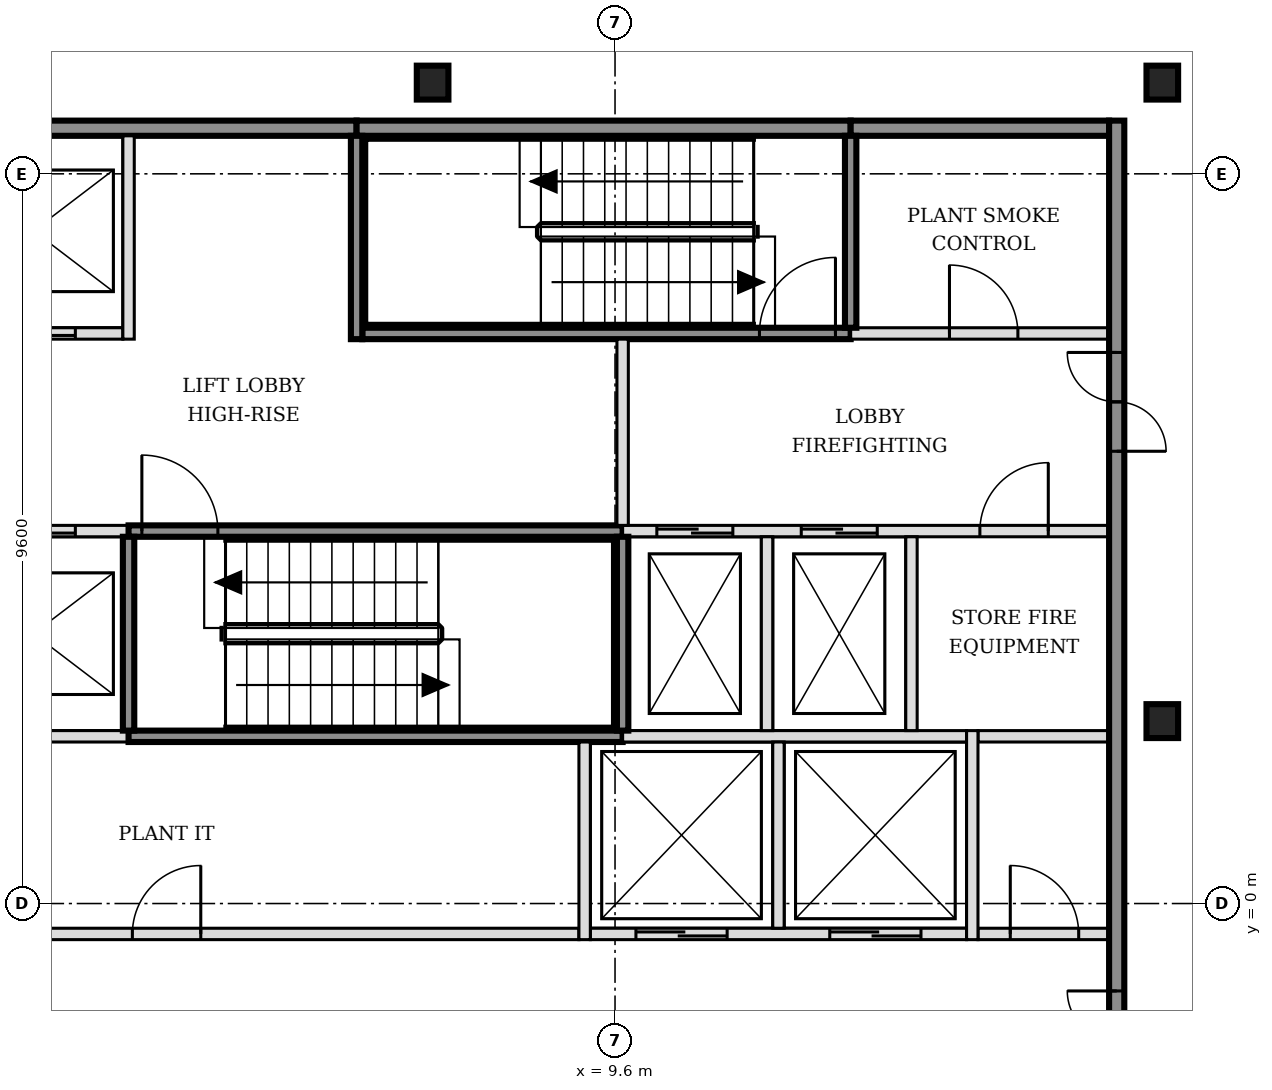
"""IFC4 building model, lengths in metres.
Left out: names, types, materials, properties, quantities, classifications, styles, units other than length and angle.
Written with IfcOpenShell. Run it as: python <this file> out.ifc"""

import sys

from ifc_helpers import new_model, si_unit, direction, frame, frame_2d, origin, origin_2d, place, context, subcontext, project, spatial, rectangle, i_section, extrude, element, fill, save


model = new_model("IFC4")
c1 = context("Model", 3, precision=1e-05, world=origin(), true_north=direction((0.0, 1.0)))
c2 = subcontext(c1, "Body", "Model", "MODEL_VIEW")
j1 = project(units=[si_unit("LENGTHUNIT", "METRE"), si_unit("PLANEANGLEUNIT", "RADIAN")], contexts=[c1])
p1 = place(None, origin())
s1 = spatial("IfcSite", under=j1, at=p1, CompositionType="ELEMENT")
p2 = place(p1, origin())
s2 = spatial("IfcBuilding", under=s1, at=p2, CompositionType="ELEMENT")
p3 = place(p2, frame((0.0, 0.0, 157.8)))
s3 = spatial("IfcBuildingStorey", under=s2, at=p3, CompositionType="ELEMENT", Elevation=157.8)
for number, where, z_axis, x_axis in (
    (1, (16.8, 2.4, -0.15), (0.0, 0.0, 1.0), (1.0, 0.0, 0.0)),
    (2, (7.2, 10.8, -0.15), (0.0, 0.0, 1.0), (1.0, 0.0, 0.0)),
    (3, (16.8, 10.8, -0.15), (0.0, 0.0, 1.0), (1.0, 0.0, 0.0)),
):
    element("IfcColumn", number, at=place(p3, frame(where, z_axis=z_axis, x_axis=x_axis)), inside=s3, PredefinedType="COLUMN", context=c2, shape_type="SweptSolid", body=[
        extrude(i_section(OverallWidth=0.416, OverallDepth=0.446, WebThickness=0.039, FlangeThickness=0.063, FilletRadius=0.015, at=origin_2d()), origin(), (0.0, 0.0, 1.0), 3.6),
    ])
p4 = place(p3, frame((-1.7, -0.4, 0.0), z_axis=(0.0, 0.0, 1.0), x_axis=(1.0, 0.0, 0.0)))
e4 = element("IfcWall", 4, at=p4, inside=s3, PredefinedType="PARTITIONING", context=c2, shape_type="SweptSolid", body=[
    extrude(rectangle(XDim=10.825, YDim=0.15, at=frame_2d((5.413, 0.0))), origin(), (0.0, 0.0, 1.0), 3.45),
])
p5 = place(p4, frame((4.95, 0.0, 0.0)))
e5 = element("IfcOpeningElement", 5, at=p5, cuts=e4, PredefinedType="OPENING", context=c2, shape_type="SweptSolid", body=[
    extrude(rectangle(XDim=0.9, YDim=2.1, at=frame_2d((0.45, 1.05))), frame((0.0, 0.085, 0.0), z_axis=(0.0, -1.0, 0.0), x_axis=(1.0, 0.0, 0.0)), (0.0, 0.0, 1.0), 0.17),
])
p6 = place(p3, frame((9.275, -0.4, 0.0), z_axis=(0.0, 0.0, 1.0), x_axis=(1.0, 0.0, 0.0)))
e6 = element("IfcWall", 6, at=p6, inside=s3, PredefinedType="SOLIDWALL", context=c2, shape_type="SweptSolid", body=[
    extrude(rectangle(XDim=4.95, YDim=0.15, at=frame_2d((2.475, 0.0))), origin(), (0.0, 0.0, 1.0), 3.45),
])
p7 = place(p6, frame((0.6, 0.0, 0.0)))
e7 = element("IfcOpeningElement", 7, at=p7, cuts=e6, PredefinedType="OPENING", context=c2, shape_type="SweptSolid", body=[
    extrude(rectangle(XDim=1.2, YDim=2.1, at=frame_2d((0.6, 1.05))), frame((0.0, 0.085, 0.0), z_axis=(0.0, -1.0, 0.0), x_axis=(1.0, 0.0, 0.0)), (0.0, 0.0, 1.0), 0.17),
])
p8 = place(p6, frame((3.15, 0.0, 0.0)))
e8 = element("IfcOpeningElement", 8, at=p8, cuts=e6, PredefinedType="OPENING", context=c2, shape_type="SweptSolid", body=[
    extrude(rectangle(XDim=1.2, YDim=2.1, at=frame_2d((0.6, 1.05))), frame((0.0, 0.085, 0.0), z_axis=(0.0, -1.0, 0.0), x_axis=(1.0, 0.0, 0.0)), (0.0, 0.0, 1.0), 0.17),
])
p9 = place(p3, frame((14.375, -0.4, 0.0), z_axis=(0.0, 0.0, 1.0), x_axis=(1.0, 0.0, 0.0)))
e9 = element("IfcWall", 9, at=p9, inside=s3, PredefinedType="PARTITIONING", context=c2, shape_type="SweptSolid", body=[
    extrude(rectangle(XDim=1.725, YDim=0.15, at=frame_2d((0.863, 0.0))), origin(), (0.0, 0.0, 1.0), 3.45),
])
p10 = place(p9, frame((0.425, 0.0, 0.0)))
e10 = element("IfcOpeningElement", 10, at=p10, cuts=e9, PredefinedType="OPENING", context=c2, shape_type="SweptSolid", body=[
    extrude(rectangle(XDim=0.9, YDim=2.1, at=frame_2d((0.45, 1.05))), frame((0.0, 0.085, 0.0), z_axis=(0.0, -1.0, 0.0), x_axis=(1.0, 0.0, 0.0)), (0.0, 0.0, 1.0), 0.17),
])
p11 = place(p3, frame((-1.7, 2.2, 0.0), z_axis=(0.0, 0.0, 1.0), x_axis=(1.0, 0.0, 0.0)))
e11 = element("IfcWall", 11, at=p11, inside=s3, PredefinedType="SOLIDWALL", context=c2, shape_type="SweptSolid", body=[
    extrude(rectangle(XDim=4.9, YDim=0.15, at=frame_2d((2.45, 0.0))), origin(), (0.0, 0.0, 1.0), 3.45),
])
p12 = place(p3, frame((3.2, 2.2, 0.0), z_axis=(0.0, 0.0, 1.0), x_axis=(1.0, 0.0, 0.0)))
e12 = element("IfcWall", 12, at=p12, inside=s3, PredefinedType="SOLIDWALL", context=c2, shape_type="SweptSolid", body=[
    extrude(rectangle(XDim=6.5, YDim=0.15, at=frame_2d((3.25, 0.0))), origin(), (0.0, 0.0, 1.0), 3.45),
])
p13 = place(p3, frame((9.7, 2.2, 0.0), z_axis=(0.0, 0.0, 1.0), x_axis=(1.0, 0.0, 0.0)))
e13 = element("IfcWall", 13, at=p13, inside=s3, PredefinedType="SOLIDWALL", context=c2, shape_type="SweptSolid", body=[
    extrude(rectangle(XDim=4.525, YDim=0.15, at=frame_2d((2.263, 0.0))), origin(), (0.0, 0.0, 1.0), 3.45),
])
p14 = place(p3, frame((14.375, 2.2, 0.0), z_axis=(0.0, 0.0, 1.0), x_axis=(1.0, 0.0, 0.0)))
e14 = element("IfcWall", 14, at=p14, inside=s3, PredefinedType="PARTITIONING", context=c2, shape_type="SweptSolid", body=[
    extrude(rectangle(XDim=1.725, YDim=0.15, at=frame_2d((0.863, 0.0))), origin(), (0.0, 0.0, 1.0), 3.45),
])
p15 = place(p3, frame((-1.7, 4.9, 0.0), z_axis=(0.0, 0.0, 1.0), x_axis=(1.0, 0.0, 0.0)))
e15 = element("IfcWall", 15, at=p15, inside=s3, PredefinedType="SOLIDWALL", context=c2, shape_type="SweptSolid", body=[
    extrude(rectangle(XDim=4.9, YDim=0.15, at=frame_2d((2.45, 0.0))), origin(), (0.0, 0.0, 1.0), 3.45),
])
p16 = place(p15, frame((0.6, 0.0, 0.0)))
e16 = element("IfcOpeningElement", 16, at=p16, cuts=e15, PredefinedType="OPENING", context=c2, shape_type="SweptSolid", body=[
    extrude(rectangle(XDim=1.1, YDim=2.1, at=frame_2d((0.55, 1.05))), frame((0.0, 0.085, 0.0), z_axis=(0.0, -1.0, 0.0), x_axis=(1.0, 0.0, 0.0)), (0.0, 0.0, 1.0), 0.17),
])
p17 = place(p15, frame((3.1, 0.0, 0.0)))
e17 = element("IfcOpeningElement", 17, at=p17, cuts=e15, PredefinedType="OPENING", context=c2, shape_type="SweptSolid", body=[
    extrude(rectangle(XDim=1.1, YDim=2.1, at=frame_2d((0.55, 1.05))), frame((0.0, 0.085, 0.0), z_axis=(0.0, -1.0, 0.0), x_axis=(1.0, 0.0, 0.0)), (0.0, 0.0, 1.0), 0.17),
])
p18 = place(p3, frame((3.2, 4.9, 0.0), z_axis=(0.0, 0.0, 1.0), x_axis=(1.0, 0.0, 0.0)))
e18 = element("IfcWall", 18, at=p18, inside=s3, PredefinedType="SOLIDWALL", context=c2, shape_type="SweptSolid", body=[
    extrude(rectangle(XDim=6.5, YDim=0.15, at=frame_2d((3.25, 0.0))), origin(), (0.0, 0.0, 1.0), 3.45),
])
p19 = place(p18, frame((0.175, 0.0, 0.0)))
e19 = element("IfcOpeningElement", 19, at=p19, cuts=e18, PredefinedType="OPENING", context=c2, shape_type="SweptSolid", body=[
    extrude(rectangle(XDim=1.0, YDim=2.1, at=frame_2d((0.5, 1.05))), frame((0.0, 0.085, 0.0), z_axis=(0.0, -1.0, 0.0), x_axis=(1.0, 0.0, 0.0)), (0.0, 0.0, 1.0), 0.17),
])
p20 = place(p3, frame((9.7, 4.9, 0.0), z_axis=(0.0, 0.0, 1.0), x_axis=(1.0, 0.0, 0.0)))
e20 = element("IfcWall", 20, at=p20, inside=s3, PredefinedType="SOLIDWALL", context=c2, shape_type="SweptSolid", body=[
    extrude(rectangle(XDim=6.4, YDim=0.15, at=frame_2d((3.2, 0.0))), origin(), (0.0, 0.0, 1.0), 3.45),
])
p21 = place(p20, frame((0.45, 0.0, 0.0)))
e21 = element("IfcOpeningElement", 21, at=p21, cuts=e20, PredefinedType="OPENING", context=c2, shape_type="SweptSolid", body=[
    extrude(rectangle(XDim=1.0, YDim=2.1, at=frame_2d((0.5, 1.05))), frame((0.0, 0.085, 0.0), z_axis=(0.0, -1.0, 0.0), x_axis=(1.0, 0.0, 0.0)), (0.0, 0.0, 1.0), 0.17),
])
p22 = place(p20, frame((2.35, 0.0, 0.0)))
e22 = element("IfcOpeningElement", 22, at=p22, cuts=e20, PredefinedType="OPENING", context=c2, shape_type="SweptSolid", body=[
    extrude(rectangle(XDim=1.0, YDim=2.1, at=frame_2d((0.5, 1.05))), frame((0.0, 0.085, 0.0), z_axis=(0.0, -1.0, 0.0), x_axis=(1.0, 0.0, 0.0)), (0.0, 0.0, 1.0), 0.17),
])
p23 = place(p20, frame((4.7, 0.0, 0.0)))
e23 = element("IfcOpeningElement", 23, at=p23, cuts=e20, PredefinedType="OPENING", context=c2, shape_type="SweptSolid", body=[
    extrude(rectangle(XDim=0.9, YDim=2.1, at=frame_2d((0.45, 1.05))), frame((0.0, 0.085, 0.0), z_axis=(0.0, -1.0, 0.0), x_axis=(1.0, 0.0, 0.0)), (0.0, 0.0, 1.0), 0.17),
])
p24 = place(p3, frame((-1.7, 7.5, 0.0), z_axis=(0.0, 0.0, 1.0), x_axis=(1.0, 0.0, 0.0)))
e24 = element("IfcWall", 24, at=p24, inside=s3, PredefinedType="SOLIDWALL", context=c2, shape_type="SweptSolid", body=[
    extrude(rectangle(XDim=4.825, YDim=0.15, at=frame_2d((2.413, 0.0))), origin(), (0.0, 0.0, 1.0), 3.45),
])
p25 = place(p24, frame((0.6, 0.0, 0.0)))
e25 = element("IfcOpeningElement", 25, at=p25, cuts=e24, PredefinedType="OPENING", context=c2, shape_type="SweptSolid", body=[
    extrude(rectangle(XDim=1.1, YDim=2.1, at=frame_2d((0.55, 1.05))), frame((0.0, 0.085, 0.0), z_axis=(0.0, -1.0, 0.0), x_axis=(1.0, 0.0, 0.0)), (0.0, 0.0, 1.0), 0.17),
])
p26 = place(p24, frame((3.1, 0.0, 0.0)))
e26 = element("IfcOpeningElement", 26, at=p26, cuts=e24, PredefinedType="OPENING", context=c2, shape_type="SweptSolid", body=[
    extrude(rectangle(XDim=1.1, YDim=2.1, at=frame_2d((0.55, 1.05))), frame((0.0, 0.085, 0.0), z_axis=(0.0, -1.0, 0.0), x_axis=(1.0, 0.0, 0.0)), (0.0, 0.0, 1.0), 0.17),
])
p27 = place(p3, frame((6.275, 7.5, 0.0), z_axis=(0.0, 0.0, 1.0), x_axis=(1.0, 0.0, 0.0)))
e27 = element("IfcWall", 27, at=p27, inside=s3, PredefinedType="SOLIDWALL", context=c2, shape_type="SweptSolid", body=[
    extrude(rectangle(XDim=6.425, YDim=0.15, at=frame_2d((3.212, 0.0))), origin(), (0.0, 0.0, 1.0), 3.45),
])
p28 = place(p27, frame((5.225, 0.0, 0.0)))
e28 = element("IfcOpeningElement", 28, at=p28, cuts=e27, PredefinedType="OPENING", context=c2, shape_type="SweptSolid", body=[
    extrude(rectangle(XDim=1.0, YDim=2.1, at=frame_2d((0.5, 1.05))), frame((0.0, 0.085, 0.0), z_axis=(0.0, -1.0, 0.0), x_axis=(1.0, 0.0, 0.0)), (0.0, 0.0, 1.0), 0.17),
])
p29 = place(p3, frame((12.7, 7.5, 0.0), z_axis=(0.0, 0.0, 1.0), x_axis=(1.0, 0.0, 0.0)))
e29 = element("IfcWall", 29, at=p29, inside=s3, PredefinedType="SOLIDWALL", context=c2, shape_type="SweptSolid", body=[
    extrude(rectangle(XDim=3.4, YDim=0.15, at=frame_2d((1.7, 0.0))), origin(), (0.0, 0.0, 1.0), 3.45),
])
p30 = place(p29, frame((1.3, 0.0, 0.0)))
e30 = element("IfcOpeningElement", 30, at=p30, cuts=e29, PredefinedType="OPENING", context=c2, shape_type="SweptSolid", body=[
    extrude(rectangle(XDim=0.9, YDim=2.1, at=frame_2d((0.45, 1.05))), frame((0.0, 0.085, 0.0), z_axis=(0.0, -1.0, 0.0), x_axis=(1.0, 0.0, 0.0)), (0.0, 0.0, 1.0), 0.17),
])
p31 = place(p3, frame((-1.7, 10.2, 0.0), z_axis=(0.0, 0.0, 1.0), x_axis=(1.0, 0.0, 0.0)))
e31 = element("IfcWall", 31, at=p31, inside=s3, PredefinedType="SOLIDWALL", context=c2, shape_type="SweptSolid", body=[
    extrude(rectangle(XDim=7.9, YDim=0.2, at=frame_2d((3.95, 0.0))), origin(), (0.0, 0.0, 1.0), 3.45),
])
p32 = place(p3, frame((6.2, 10.2, 0.0), z_axis=(0.0, 0.0, 1.0), x_axis=(1.0, 0.0, 0.0)))
e32 = element("IfcWall", 32, at=p32, inside=s3, PredefinedType="SOLIDWALL", context=c2, shape_type="SweptSolid", body=[
    extrude(rectangle(XDim=6.5, YDim=0.2, at=frame_2d((3.25, 0.0))), origin(), (0.0, 0.0, 1.0), 3.45),
])
p33 = place(p3, frame((12.7, 10.2, 0.0), z_axis=(0.0, 0.0, 1.0), x_axis=(1.0, 0.0, 0.0)))
e33 = element("IfcWall", 33, at=p33, inside=s3, PredefinedType="SOLIDWALL", context=c2, shape_type="SweptSolid", body=[
    extrude(rectangle(XDim=3.4, YDim=0.2, at=frame_2d((1.7, 0.0))), origin(), (0.0, 0.0, 1.0), 3.45),
])
p34 = place(p3, frame((3.2, 2.275, 0.0), z_axis=(0.0, 0.0, 1.0), x_axis=(0.0, 1.0, 0.0)))
e34 = element("IfcWall", 34, at=p34, inside=s3, PredefinedType="SOLIDWALL", context=c2, shape_type="SweptSolid", body=[
    extrude(rectangle(XDim=2.55, YDim=0.15, at=frame_2d((1.275, 0.0))), origin(), (0.0, 0.0, 1.0), 3.45),
])
for number, where, z_axis, x_axis in (
    (35, (3.2, 7.425, 0.0), (0.0, 0.0, 1.0), (0.0, 1.0, 0.0)),
    (36, (6.2, 7.425, 0.0), (0.0, 0.0, 1.0), (0.0, 1.0, 0.0)),
):
    element("IfcWall", number, at=place(p3, frame(where, z_axis=z_axis, x_axis=x_axis)), inside=s3, PredefinedType="SOLIDWALL", context=c2, shape_type="SweptSolid", body=[
        extrude(rectangle(XDim=2.675, YDim=0.15, at=frame_2d((1.337, 0.0))), origin(), (0.0, 0.0, 1.0), 3.45),
    ])
p35 = place(p3, frame((9.2, -0.475, 0.0), z_axis=(0.0, 0.0, 1.0), x_axis=(0.0, 1.0, 0.0)))
e37 = element("IfcWall", 37, at=p35, inside=s3, PredefinedType="SOLIDWALL", context=c2, shape_type="SweptSolid", body=[
    extrude(rectangle(XDim=2.6, YDim=0.15, at=frame_2d((1.3, 0.0))), origin(), (0.0, 0.0, 1.0), 3.45),
])
p36 = place(p3, frame((9.7, 2.275, 0.0), z_axis=(0.0, 0.0, 1.0), x_axis=(0.0, 1.0, 0.0)))
e38 = element("IfcWall", 38, at=p36, inside=s3, PredefinedType="SOLIDWALL", context=c2, shape_type="SweptSolid", body=[
    extrude(rectangle(XDim=2.55, YDim=0.15, at=frame_2d((1.275, 0.0))), origin(), (0.0, 0.0, 1.0), 3.45),
])
p37 = place(p3, frame((9.7, 4.975, 0.0), z_axis=(0.0, 0.0, 1.0), x_axis=(0.0, 1.0, 0.0)))
e39 = element("IfcWall", 39, at=p37, inside=s3, PredefinedType="SOLIDWALL", context=c2, shape_type="SweptSolid", body=[
    extrude(rectangle(XDim=2.45, YDim=0.15, at=frame_2d((1.225, 0.0))), origin(), (0.0, 0.0, 1.0), 3.45),
])
p38 = place(p3, frame((11.6, 2.275, 0.0), z_axis=(0.0, 0.0, 1.0), x_axis=(0.0, 1.0, 0.0)))
e40 = element("IfcWall", 40, at=p38, inside=s3, PredefinedType="SOLIDWALL", context=c2, shape_type="SweptSolid", body=[
    extrude(rectangle(XDim=2.55, YDim=0.15, at=frame_2d((1.275, 0.0))), origin(), (0.0, 0.0, 1.0), 3.45),
])
p39 = place(p3, frame((11.75, -0.325, 0.0), z_axis=(0.0, 0.0, 1.0), x_axis=(0.0, 1.0, 0.0)))
e41 = element("IfcWall", 41, at=p39, inside=s3, PredefinedType="SOLIDWALL", context=c2, shape_type="SweptSolid", body=[
    extrude(rectangle(XDim=2.45, YDim=0.15, at=frame_2d((1.225, 0.0))), origin(), (0.0, 0.0, 1.0), 3.45),
])
p40 = place(p3, frame((12.7, 7.575, 0.0), z_axis=(0.0, 0.0, 1.0), x_axis=(0.0, 1.0, 0.0)))
e42 = element("IfcWall", 42, at=p40, inside=s3, PredefinedType="SOLIDWALL", context=c2, shape_type="SweptSolid", body=[
    extrude(rectangle(XDim=2.525, YDim=0.15, at=frame_2d((1.263, 0.0))), origin(), (0.0, 0.0, 1.0), 3.45),
])
p41 = place(p3, frame((13.5, 2.275, 0.0), z_axis=(0.0, 0.0, 1.0), x_axis=(0.0, 1.0, 0.0)))
e43 = element("IfcWall", 43, at=p41, inside=s3, PredefinedType="SOLIDWALL", context=c2, shape_type="SweptSolid", body=[
    extrude(rectangle(XDim=2.55, YDim=0.15, at=frame_2d((1.275, 0.0))), origin(), (0.0, 0.0, 1.0), 3.45),
])
p42 = place(p3, frame((14.3, -0.475, 0.0), z_axis=(0.0, 0.0, 1.0), x_axis=(0.0, 1.0, 0.0)))
e44 = element("IfcWall", 44, at=p42, inside=s3, PredefinedType="SOLIDWALL", context=c2, shape_type="SweptSolid", body=[
    extrude(rectangle(XDim=2.75, YDim=0.15, at=frame_2d((1.375, 0.0))), origin(), (0.0, 0.0, 1.0), 3.45),
])
p43 = place(p3, frame((16.2, -5.5, 0.0), z_axis=(0.0, 0.0, 1.0), x_axis=(0.0, 1.0, 0.0)))
e45 = element("IfcWall", 45, at=p43, inside=s3, PredefinedType="SOLIDWALL", context=c2, shape_type="SweptSolid", body=[
    extrude(rectangle(XDim=15.8, YDim=0.2, at=frame_2d((7.9, 0.0))), origin(), (0.0, 0.0, 1.0), 3.45),
])
p44 = place(p43, frame((3.05, 0.0, 0.0)))
e46 = element("IfcOpeningElement", 46, at=p44, cuts=e45, PredefinedType="OPENING", context=c2, shape_type="SweptSolid", body=[
    extrude(rectangle(XDim=1.3, YDim=2.1, at=frame_2d((0.65, 1.05))), frame((0.0, 0.11, 0.0), z_axis=(0.0, -1.0, 0.0), x_axis=(1.0, 0.0, 0.0)), (0.0, 0.0, 1.0), 0.22),
])
p45 = place(p43, frame((11.45, 0.0, 0.0)))
e47 = element("IfcOpeningElement", 47, at=p45, cuts=e45, PredefinedType="OPENING", context=c2, shape_type="SweptSolid", body=[
    extrude(rectangle(XDim=1.3, YDim=2.1, at=frame_2d((0.65, 1.05))), frame((0.0, 0.11, 0.0), z_axis=(0.0, -1.0, 0.0), x_axis=(1.0, 0.0, 0.0)), (0.0, 0.0, 1.0), 0.22),
])
p46 = place(p7, origin())
e48 = element("IfcDoor", 48, at=p46, inside=s3, OperationType="DOUBLE_DOOR_SLIDING", PredefinedType="DOOR", context=c2, shape_type="SweptSolid", body=[
    extrude(rectangle(XDim=1.2, YDim=2.1, at=frame_2d((0.6, 1.05))), frame((0.0, 0.025, 0.0), z_axis=(0.0, -1.0, 0.0), x_axis=(1.0, 0.0, 0.0)), (0.0, 0.0, 1.0), 0.05),
])
fill(e7, e48)
p47 = place(p8, origin())
e49 = element("IfcDoor", 49, at=p47, inside=s3, OperationType="DOUBLE_DOOR_SLIDING", PredefinedType="DOOR", context=c2, shape_type="SweptSolid", body=[
    extrude(rectangle(XDim=1.2, YDim=2.1, at=frame_2d((0.6, 1.05))), frame((0.0, 0.025, 0.0), z_axis=(0.0, -1.0, 0.0), x_axis=(1.0, 0.0, 0.0)), (0.0, 0.0, 1.0), 0.05),
])
fill(e8, e49)
p48 = place(p17, origin())
e50 = element("IfcDoor", 50, at=p48, inside=s3, OperationType="DOUBLE_DOOR_SLIDING", PredefinedType="DOOR", context=c2, shape_type="SweptSolid", body=[
    extrude(rectangle(XDim=1.1, YDim=2.1, at=frame_2d((0.55, 1.05))), frame((0.0, 0.025, 0.0), z_axis=(0.0, -1.0, 0.0), x_axis=(1.0, 0.0, 0.0)), (0.0, 0.0, 1.0), 0.05),
])
fill(e17, e50)
p49 = place(p26, origin())
e51 = element("IfcDoor", 51, at=p49, inside=s3, OperationType="DOUBLE_DOOR_SLIDING", PredefinedType="DOOR", context=c2, shape_type="SweptSolid", body=[
    extrude(rectangle(XDim=1.1, YDim=2.1, at=frame_2d((0.55, 1.05))), frame((0.0, 0.025, 0.0), z_axis=(0.0, -1.0, 0.0), x_axis=(1.0, 0.0, 0.0)), (0.0, 0.0, 1.0), 0.05),
])
fill(e26, e51)
p50 = place(p21, origin())
e52 = element("IfcDoor", 52, at=p50, inside=s3, OperationType="DOUBLE_DOOR_SLIDING", PredefinedType="DOOR", context=c2, shape_type="SweptSolid", body=[
    extrude(rectangle(XDim=1.0, YDim=2.1, at=frame_2d((0.5, 1.05))), frame((0.0, 0.025, 0.0), z_axis=(0.0, -1.0, 0.0), x_axis=(1.0, 0.0, 0.0)), (0.0, 0.0, 1.0), 0.05),
])
fill(e21, e52)
p51 = place(p22, origin())
e53 = element("IfcDoor", 53, at=p51, inside=s3, OperationType="DOUBLE_DOOR_SLIDING", PredefinedType="DOOR", context=c2, shape_type="SweptSolid", body=[
    extrude(rectangle(XDim=1.0, YDim=2.1, at=frame_2d((0.5, 1.05))), frame((0.0, 0.025, 0.0), z_axis=(0.0, -1.0, 0.0), x_axis=(1.0, 0.0, 0.0)), (0.0, 0.0, 1.0), 0.05),
])
fill(e22, e53)
p52 = place(p19, origin())
e54 = element("IfcDoor", 54, at=p52, inside=s3, OperationType="SINGLE_SWING_LEFT", PredefinedType="DOOR", context=c2, shape_type="SweptSolid", body=[
    extrude(rectangle(XDim=1.0, YDim=2.1, at=frame_2d((0.5, 1.05))), frame((0.0, 0.025, 0.0), z_axis=(0.0, -1.0, 0.0), x_axis=(1.0, 0.0, 0.0)), (0.0, 0.0, 1.0), 0.05),
])
fill(e19, e54)
p53 = place(p28, origin())
e55 = element("IfcDoor", 55, at=p53, inside=s3, OperationType="SINGLE_SWING_RIGHT", PredefinedType="DOOR", context=c2, shape_type="SweptSolid", body=[
    extrude(rectangle(XDim=1.0, YDim=2.1, at=frame_2d((0.5, 1.05))), frame((0.0, 0.025, 0.0), z_axis=(0.0, -1.0, 0.0), x_axis=(1.0, 0.0, 0.0)), (0.0, 0.0, 1.0), 0.05),
])
fill(e28, e55)
p54 = place(p44, origin())
e56 = element("IfcDoor", 56, at=p54, inside=s3, OperationType="DOUBLE_DOOR_SINGLE_SWING", PredefinedType="DOOR", context=c2, shape_type="SweptSolid", body=[
    extrude(rectangle(XDim=1.3, YDim=2.1, at=frame_2d((0.65, 1.05))), frame((0.0, 0.025, 0.0), z_axis=(0.0, -1.0, 0.0), x_axis=(1.0, 0.0, 0.0)), (0.0, 0.0, 1.0), 0.05),
])
fill(e46, e56)
p55 = place(p45, origin())
e57 = element("IfcDoor", 57, at=p55, inside=s3, OperationType="DOUBLE_DOOR_SINGLE_SWING", PredefinedType="DOOR", context=c2, shape_type="SweptSolid", body=[
    extrude(rectangle(XDim=1.3, YDim=2.1, at=frame_2d((0.65, 1.05))), frame((0.0, 0.025, 0.0), z_axis=(0.0, -1.0, 0.0), x_axis=(1.0, 0.0, 0.0)), (0.0, 0.0, 1.0), 0.05),
])
fill(e47, e57)
p56 = place(p10, origin())
e58 = element("IfcDoor", 58, at=p56, inside=s3, OperationType="SINGLE_SWING_LEFT", PredefinedType="DOOR", context=c2, shape_type="SweptSolid", body=[
    extrude(rectangle(XDim=0.9, YDim=2.1, at=frame_2d((0.45, 1.05))), frame((0.0, 0.025, 0.0), z_axis=(0.0, -1.0, 0.0), x_axis=(1.0, 0.0, 0.0)), (0.0, 0.0, 1.0), 0.05),
])
fill(e10, e58)
p57 = place(p23, origin())
e59 = element("IfcDoor", 59, at=p57, inside=s3, OperationType="SINGLE_SWING_RIGHT", PredefinedType="DOOR", context=c2, shape_type="SweptSolid", body=[
    extrude(rectangle(XDim=0.9, YDim=2.1, at=frame_2d((0.45, 1.05))), frame((0.0, 0.025, 0.0), z_axis=(0.0, -1.0, 0.0), x_axis=(1.0, 0.0, 0.0)), (0.0, 0.0, 1.0), 0.05),
])
fill(e23, e59)
p58 = place(p30, origin())
e60 = element("IfcDoor", 60, at=p58, inside=s3, OperationType="SINGLE_SWING_LEFT", PredefinedType="DOOR", context=c2, shape_type="SweptSolid", body=[
    extrude(rectangle(XDim=0.9, YDim=2.1, at=frame_2d((0.45, 1.05))), frame((0.0, 0.025, 0.0), z_axis=(0.0, -1.0, 0.0), x_axis=(1.0, 0.0, 0.0)), (0.0, 0.0, 1.0), 0.05),
])
fill(e30, e60)
p59 = place(p5, origin())
e61 = element("IfcDoor", 61, at=p59, inside=s3, OperationType="SINGLE_SWING_RIGHT", PredefinedType="DOOR", context=c2, shape_type="SweptSolid", body=[
    extrude(rectangle(XDim=0.9, YDim=2.1, at=frame_2d((0.45, 1.05))), frame((0.0, 0.025, 0.0), z_axis=(0.0, -1.0, 0.0), x_axis=(1.0, 0.0, 0.0)), (0.0, 0.0, 1.0), 0.05),
])
fill(e5, e61)
save(model, sys.argv[1])
